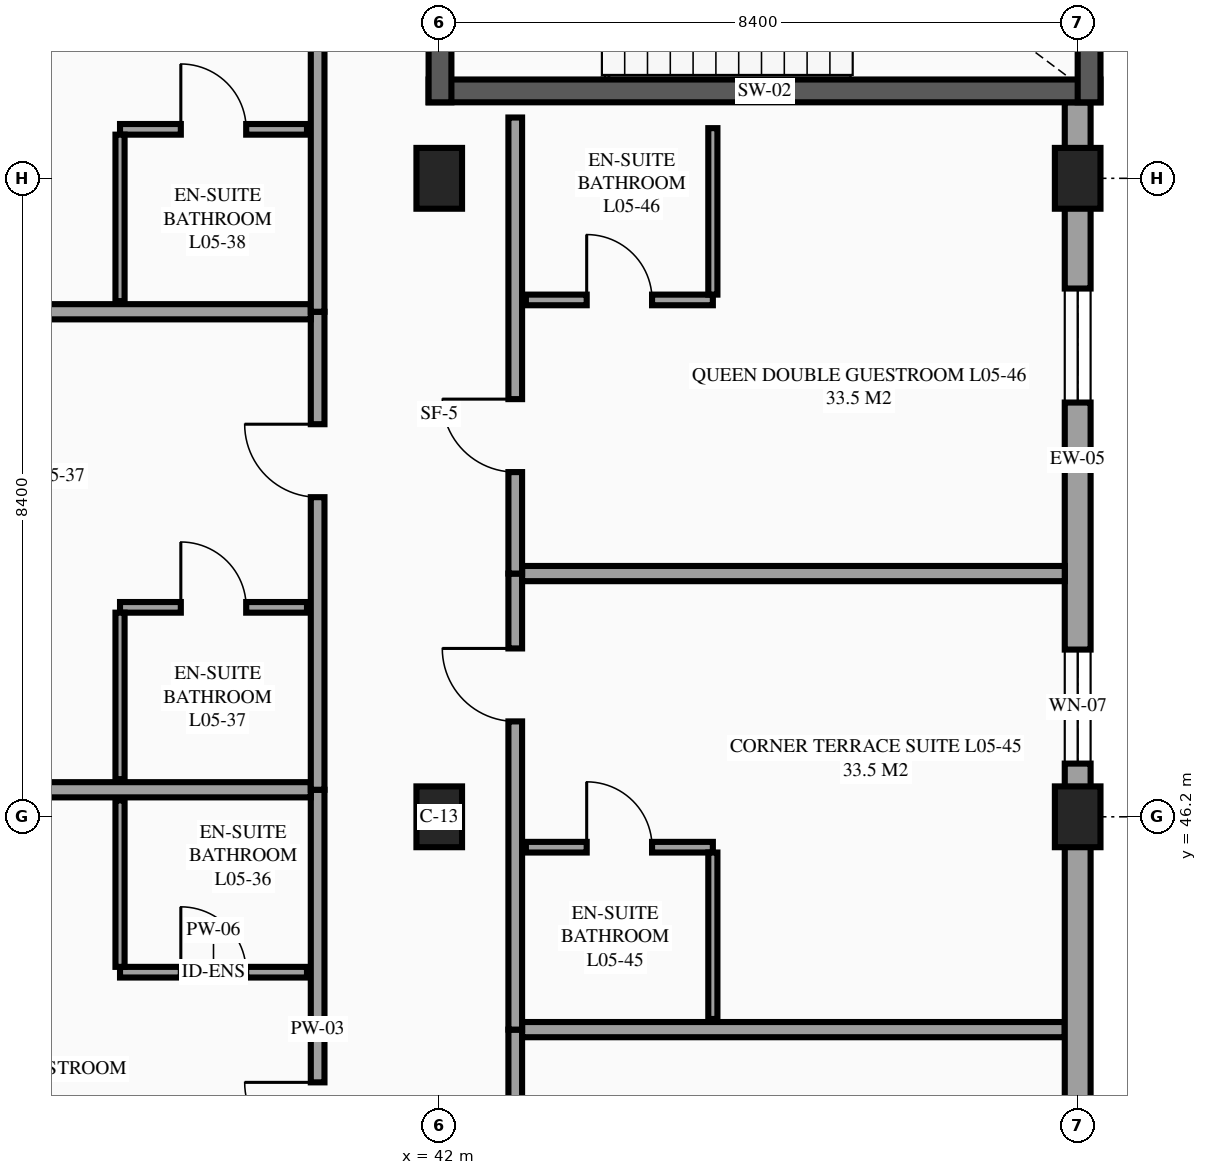
"""IFC4 building model, lengths in metres.
Left out: names, types, materials, properties, quantities, classifications, styles, units other than length and angle.
Written with IfcOpenShell. Run it as: python <this file> out.ifc"""

import sys

from ifc_helpers import new_model, si_unit, direction, frame, frame_2d, origin, origin_2d, place, context, subcontext, project, spatial, rectangle, extrude, element, fill, save


model = new_model("IFC4")
c1 = context("Model", 3, precision=1e-05, world=origin(), true_north=direction((0.0, 1.0)))
c2 = subcontext(c1, "Body", "Model", "MODEL_VIEW")
j1 = project(units=[si_unit("LENGTHUNIT", "METRE"), si_unit("PLANEANGLEUNIT", "RADIAN")], contexts=[c1])
p1 = place(None, origin())
s1 = spatial("IfcSite", under=j1, at=p1, CompositionType="ELEMENT")
p2 = place(p1, origin())
s2 = spatial("IfcBuilding", under=s1, at=p2, CompositionType="ELEMENT")
p3 = place(p2, frame((0.0, 0.0, 21.9)))
s3 = spatial("IfcBuildingStorey", under=s2, at=p3, CompositionType="ELEMENT", Elevation=21.9)
for number, where, z_axis, x_axis in (
    (1, (42.0, 46.2, 0.0), (0.0, 0.0, 1.0), (1.0, 0.0, 0.0)),
    (2, (42.0, 54.6, 0.0), (0.0, 0.0, 1.0), (1.0, 0.0, 0.0)),
    (3, (50.4, 46.2, 0.0), (0.0, 0.0, 1.0), (1.0, 0.0, 0.0)),
    (4, (50.4, 54.6, 0.0), (0.0, 0.0, 1.0), (1.0, 0.0, 0.0)),
):
    element("IfcColumn", number, at=place(p3, frame(where, z_axis=z_axis, x_axis=x_axis)), inside=s3, PredefinedType="COLUMN", context=c2, shape_type="SweptSolid", body=[
        extrude(rectangle(XDim=0.6, YDim=0.8, at=origin_2d()), origin(), (0.0, 0.0, 1.0), 3.6),
    ])
p4 = place(p3, frame((50.4, 46.2, 0.0), z_axis=(0.0, 0.0, 1.0), x_axis=(0.0, 1.0, 0.0)))
e5 = element("IfcWall", 5, at=p4, inside=s3, PredefinedType="STANDARD", context=c2, shape_type="SweptSolid", body=[
    extrude(rectangle(XDim=9.4, YDim=0.34, at=frame_2d((4.7, 0.0))), origin(), (0.0, 0.0, 1.0), 2.48),
])
p5 = place(p4, frame((0.7, 0.0, 0.85)))
e6 = element("IfcOpeningElement", 6, at=p5, cuts=e5, PredefinedType="OPENING", context=c2, shape_type="SweptSolid", body=[
    extrude(rectangle(XDim=1.5, YDim=1.5, at=frame_2d((0.75, 0.75))), frame((0.0, 0.18, 0.0), z_axis=(0.0, -1.0, 0.0), x_axis=(1.0, 0.0, 0.0)), (0.0, 0.0, 1.0), 0.36),
])
p6 = place(p4, frame((5.45, 0.0, 0.85)))
e7 = element("IfcOpeningElement", 7, at=p6, cuts=e5, PredefinedType="OPENING", context=c2, shape_type="SweptSolid", body=[
    extrude(rectangle(XDim=1.5, YDim=1.5, at=frame_2d((0.75, 0.75))), frame((0.0, 0.18, 0.0), z_axis=(0.0, -1.0, 0.0), x_axis=(1.0, 0.0, 0.0)), (0.0, 0.0, 1.0), 0.36),
])
p7 = place(p3, frame((41.86, 55.75, 0.0), z_axis=(0.0, 0.0, 1.0), x_axis=(1.0, 0.0, 0.0)))
e8 = element("IfcWall", 8, at=p7, inside=s3, PredefinedType="SHEAR", context=c2, shape_type="SweptSolid", body=[
    extrude(rectangle(XDim=8.84, YDim=0.3, at=frame_2d((4.42, 0.0))), origin(), (0.0, 0.0, 1.0), 3.6),
])
p8 = place(p3, frame((50.55, 55.6, 0.0), z_axis=(0.0, 0.0, 1.0), x_axis=(0.0, 1.0, 0.0)))
e9 = element("IfcWall", 9, at=p8, inside=s3, PredefinedType="SHEAR", context=c2, shape_type="SweptSolid", body=[
    extrude(rectangle(XDim=5.2, YDim=0.3, at=frame_2d((2.6, 0.0))), origin(), (0.0, 0.0, 1.0), 3.6),
])
p9 = place(p3, frame((42.01, 60.8, 0.0), z_axis=(0.0, 0.0, 1.0), x_axis=(0.0, -1.0, 0.0)))
e10 = element("IfcWall", 10, at=p9, inside=s3, PredefinedType="SHEAR", context=c2, shape_type="SweptSolid", body=[
    extrude(rectangle(XDim=5.2, YDim=0.3, at=frame_2d((2.6, 0.0))), origin(), (0.0, 0.0, 1.0), 3.6),
])
p10 = place(p9, frame((3.0, 0.0, 0.0)))
e11 = element("IfcOpeningElement", 11, at=p10, cuts=e10, PredefinedType="OPENING", context=c2, shape_type="SweptSolid", body=[
    extrude(rectangle(XDim=1.15, YDim=2.15, at=frame_2d((0.575, 1.075))), frame((0.0, 0.16, 0.0), z_axis=(0.0, -1.0, 0.0), x_axis=(1.0, 0.0, 0.0)), (0.0, 0.0, 1.0), 0.32),
])
p11 = place(p3, frame((40.4, 40.267, 0.0), z_axis=(0.0, 0.0, 1.0), x_axis=(0.0, 1.0, 0.0)))
e12 = element("IfcWall", 12, at=p11, inside=s3, PredefinedType="PARTITIONING", context=c2, shape_type="SweptSolid", body=[
    extrude(rectangle(XDim=6.289, YDim=0.18, at=frame_2d((3.145, 0.0))), origin(), (0.0, 0.0, 1.0), 3.375),
])
p12 = place(p11, frame((1.479, 0.0, 0.0)))
e13 = element("IfcOpeningElement", 13, at=p12, cuts=e12, PredefinedType="OPENING", context=c2, shape_type="SweptSolid", body=[
    extrude(rectangle(XDim=0.96, YDim=2.15, at=frame_2d((0.48, 1.075))), frame((0.0, 0.1, 0.0), z_axis=(0.0, -1.0, 0.0), x_axis=(1.0, 0.0, 0.0)), (0.0, 0.0, 1.0), 0.2),
])
p13 = place(p3, frame((34.05, 46.556, 0.0), z_axis=(0.0, 0.0, 1.0), x_axis=(1.0, 0.0, 0.0)))
e14 = element("IfcWall", 14, at=p13, inside=s3, PredefinedType="PARTITIONING", context=c2, shape_type="SweptSolid", body=[
    extrude(rectangle(XDim=6.26, YDim=0.2, at=frame_2d((3.13, 0.0))), origin(), (0.0, 0.0, 1.0), 3.375),
])
p14 = place(p3, frame((37.8, 44.156, 0.0), z_axis=(0.0, 0.0, 1.0), x_axis=(1.0, 0.0, 0.0)))
e15 = element("IfcWall", 15, at=p14, inside=s3, PredefinedType="PARTITIONING", context=c2, shape_type="SweptSolid", body=[
    extrude(rectangle(XDim=2.46, YDim=0.14, at=frame_2d((1.23, 0.0))), origin(), (0.0, 0.0, 1.0), 3.375),
])
p15 = place(p14, frame((0.8, 0.0, 0.0)))
e16 = element("IfcOpeningElement", 16, at=p15, cuts=e15, PredefinedType="OPENING", context=c2, shape_type="SweptSolid", body=[
    extrude(rectangle(XDim=0.86, YDim=2.1, at=frame_2d((0.43, 1.05))), frame((0.0, 0.08, 0.0), z_axis=(0.0, -1.0, 0.0), x_axis=(1.0, 0.0, 0.0)), (0.0, 0.0, 1.0), 0.16),
])
p16 = place(p3, frame((37.8, 44.226, 0.0), z_axis=(0.0, 0.0, 1.0), x_axis=(0.0, 1.0, 0.0)))
e17 = element("IfcWall", 17, at=p16, inside=s3, PredefinedType="PARTITIONING", context=c2, shape_type="SweptSolid", body=[
    extrude(rectangle(XDim=2.19, YDim=0.12, at=frame_2d((1.095, 0.0))), origin(), (0.0, 0.0, 1.0), 3.375),
])
p17 = place(p3, frame((40.4, 46.556, 0.0), z_axis=(0.0, 0.0, 1.0), x_axis=(0.0, 1.0, 0.0)))
e18 = element("IfcWall", 18, at=p17, inside=s3, PredefinedType="PARTITIONING", context=c2, shape_type="SweptSolid", body=[
    extrude(rectangle(XDim=6.289, YDim=0.18, at=frame_2d((3.145, 0.0))), origin(), (0.0, 0.0, 1.0), 3.375),
])
p18 = place(p17, frame((3.849, 0.0, 0.0)))
e19 = element("IfcOpeningElement", 19, at=p18, cuts=e18, PredefinedType="OPENING", context=c2, shape_type="SweptSolid", body=[
    extrude(rectangle(XDim=0.96, YDim=2.15, at=frame_2d((0.48, 1.075))), frame((0.0, 0.1, 0.0), z_axis=(0.0, -1.0, 0.0), x_axis=(1.0, 0.0, 0.0)), (0.0, 0.0, 1.0), 0.2),
])
p19 = place(p3, frame((33.77, 52.844, 0.0), z_axis=(0.0, 0.0, 1.0), x_axis=(1.0, 0.0, 0.0)))
e20 = element("IfcWall", 20, at=p19, inside=s3, PredefinedType="PARTITIONING", context=c2, shape_type="SweptSolid", body=[
    extrude(rectangle(XDim=6.54, YDim=0.2, at=frame_2d((3.27, 0.0))), origin(), (0.0, 0.0, 1.0), 3.375),
])
p20 = place(p3, frame((37.8, 48.956, 0.0), z_axis=(0.0, 0.0, 1.0), x_axis=(1.0, 0.0, 0.0)))
e21 = element("IfcWall", 21, at=p20, inside=s3, PredefinedType="PARTITIONING", context=c2, shape_type="SweptSolid", body=[
    extrude(rectangle(XDim=2.46, YDim=0.14, at=frame_2d((1.23, 0.0))), origin(), (0.0, 0.0, 1.0), 3.375),
])
p21 = place(p20, frame((0.8, 0.0, 0.0)))
e22 = element("IfcOpeningElement", 22, at=p21, cuts=e21, PredefinedType="OPENING", context=c2, shape_type="SweptSolid", body=[
    extrude(rectangle(XDim=0.86, YDim=2.1, at=frame_2d((0.43, 1.05))), frame((0.0, 0.08, 0.0), z_axis=(0.0, -1.0, 0.0), x_axis=(1.0, 0.0, 0.0)), (0.0, 0.0, 1.0), 0.16),
])
p22 = place(p3, frame((37.8, 46.696, 0.0), z_axis=(0.0, 0.0, 1.0), x_axis=(0.0, 1.0, 0.0)))
e23 = element("IfcWall", 23, at=p22, inside=s3, PredefinedType="PARTITIONING", context=c2, shape_type="SweptSolid", body=[
    extrude(rectangle(XDim=2.19, YDim=0.12, at=frame_2d((1.095, 0.0))), origin(), (0.0, 0.0, 1.0), 3.375),
])
p23 = place(p3, frame((40.4, 52.844, 0.0), z_axis=(0.0, 0.0, 1.0), x_axis=(0.0, 1.0, 0.0)))
e24 = element("IfcWall", 24, at=p23, inside=s3, PredefinedType="PARTITIONING", context=c2, shape_type="SweptSolid", body=[
    extrude(rectangle(XDim=6.289, YDim=0.18, at=frame_2d((3.145, 0.0))), origin(), (0.0, 0.0, 1.0), 3.375),
])
p24 = place(p23, frame((3.85, 0.0, 0.0)))
e25 = element("IfcOpeningElement", 25, at=p24, cuts=e24, PredefinedType="OPENING", context=c2, shape_type="SweptSolid", body=[
    extrude(rectangle(XDim=0.96, YDim=2.15, at=frame_2d((0.48, 1.075))), frame((0.0, 0.1, 0.0), z_axis=(0.0, -1.0, 0.0), x_axis=(1.0, 0.0, 0.0)), (0.0, 0.0, 1.0), 0.2),
])
p25 = place(p3, frame((37.8, 55.244, 0.0), z_axis=(0.0, 0.0, 1.0), x_axis=(1.0, 0.0, 0.0)))
e26 = element("IfcWall", 26, at=p25, inside=s3, PredefinedType="PARTITIONING", context=c2, shape_type="SweptSolid", body=[
    extrude(rectangle(XDim=2.46, YDim=0.14, at=frame_2d((1.23, 0.0))), origin(), (0.0, 0.0, 1.0), 3.375),
])
p26 = place(p25, frame((0.8, 0.0, 0.0)))
e27 = element("IfcOpeningElement", 27, at=p26, cuts=e26, PredefinedType="OPENING", context=c2, shape_type="SweptSolid", body=[
    extrude(rectangle(XDim=0.86, YDim=2.1, at=frame_2d((0.43, 1.05))), frame((0.0, 0.08, 0.0), z_axis=(0.0, -1.0, 0.0), x_axis=(1.0, 0.0, 0.0)), (0.0, 0.0, 1.0), 0.16),
])
p27 = place(p3, frame((37.8, 52.984, 0.0), z_axis=(0.0, 0.0, 1.0), x_axis=(0.0, 1.0, 0.0)))
e28 = element("IfcWall", 28, at=p27, inside=s3, PredefinedType="PARTITIONING", context=c2, shape_type="SweptSolid", body=[
    extrude(rectangle(XDim=2.19, YDim=0.12, at=frame_2d((1.095, 0.0))), origin(), (0.0, 0.0, 1.0), 3.375),
])
p28 = place(p3, frame((43.0, 37.4, 0.0), z_axis=(0.0, 0.0, 1.0), x_axis=(0.0, 1.0, 0.0)))
e29 = element("IfcWall", 29, at=p28, inside=s3, PredefinedType="PARTITIONING", context=c2, shape_type="SweptSolid", body=[
    extrude(rectangle(XDim=6.0, YDim=0.18, at=frame_2d((3.0, 0.0))), origin(), (0.0, 0.0, 1.0), 3.375),
])
p29 = place(p28, frame((3.705, 0.0, 0.0)))
e30 = element("IfcOpeningElement", 30, at=p29, cuts=e29, PredefinedType="OPENING", context=c2, shape_type="SweptSolid", body=[
    extrude(rectangle(XDim=0.96, YDim=2.15, at=frame_2d((0.48, 1.075))), frame((0.0, 0.1, 0.0), z_axis=(0.0, -1.0, 0.0), x_axis=(1.0, 0.0, 0.0)), (0.0, 0.0, 1.0), 0.2),
])
p30 = place(p3, frame((43.09, 43.4, 0.0), z_axis=(0.0, 0.0, 1.0), x_axis=(1.0, 0.0, 0.0)))
e31 = element("IfcWall", 31, at=p30, inside=s3, PredefinedType="PARTITIONING", context=c2, shape_type="SweptSolid", body=[
    extrude(rectangle(XDim=7.14, YDim=0.2, at=frame_2d((3.57, 0.0))), origin(), (0.0, 0.0, 1.0), 3.375),
])
p31 = place(p3, frame((43.0, 43.4, 0.0), z_axis=(0.0, 0.0, 1.0), x_axis=(0.0, 1.0, 0.0)))
e32 = element("IfcWall", 32, at=p31, inside=s3, PredefinedType="PARTITIONING", context=c2, shape_type="SweptSolid", body=[
    extrude(rectangle(XDim=6.0, YDim=0.18, at=frame_2d((3.0, 0.0))), origin(), (0.0, 0.0, 1.0), 3.375),
])
p32 = place(p31, frame((4.055, 0.0, 0.0)))
e33 = element("IfcOpeningElement", 33, at=p32, cuts=e32, PredefinedType="OPENING", context=c2, shape_type="SweptSolid", body=[
    extrude(rectangle(XDim=0.96, YDim=2.15, at=frame_2d((0.48, 1.075))), frame((0.0, 0.1, 0.0), z_axis=(0.0, -1.0, 0.0), x_axis=(1.0, 0.0, 0.0)), (0.0, 0.0, 1.0), 0.2),
])
p33 = place(p3, frame((43.09, 49.4, 0.0), z_axis=(0.0, 0.0, 1.0), x_axis=(1.0, 0.0, 0.0)))
e34 = element("IfcWall", 34, at=p33, inside=s3, PredefinedType="PARTITIONING", context=c2, shape_type="SweptSolid", body=[
    extrude(rectangle(XDim=7.14, YDim=0.2, at=frame_2d((3.57, 0.0))), origin(), (0.0, 0.0, 1.0), 3.375),
])
p34 = place(p3, frame((43.14, 45.8, 0.0), z_axis=(0.0, 0.0, 1.0), x_axis=(1.0, 0.0, 0.0)))
e35 = element("IfcWall", 35, at=p34, inside=s3, PredefinedType="PARTITIONING", context=c2, shape_type="SweptSolid", body=[
    extrude(rectangle(XDim=2.46, YDim=0.14, at=frame_2d((1.23, 0.0))), origin(), (0.0, 0.0, 1.0), 3.375),
])
p35 = place(p34, frame((0.8, 0.0, 0.0)))
e36 = element("IfcOpeningElement", 36, at=p35, cuts=e35, PredefinedType="OPENING", context=c2, shape_type="SweptSolid", body=[
    extrude(rectangle(XDim=0.86, YDim=2.1, at=frame_2d((0.43, 1.05))), frame((0.0, 0.08, 0.0), z_axis=(0.0, -1.0, 0.0), x_axis=(1.0, 0.0, 0.0)), (0.0, 0.0, 1.0), 0.16),
])
p36 = place(p3, frame((45.6, 43.54, 0.0), z_axis=(0.0, 0.0, 1.0), x_axis=(0.0, 1.0, 0.0)))
e37 = element("IfcWall", 37, at=p36, inside=s3, PredefinedType="PARTITIONING", context=c2, shape_type="SweptSolid", body=[
    extrude(rectangle(XDim=2.19, YDim=0.12, at=frame_2d((1.095, 0.0))), origin(), (0.0, 0.0, 1.0), 3.375),
])
p37 = place(p3, frame((43.0, 49.4, 0.0), z_axis=(0.0, 0.0, 1.0), x_axis=(0.0, 1.0, 0.0)))
e38 = element("IfcWall", 38, at=p37, inside=s3, PredefinedType="PARTITIONING", context=c2, shape_type="SweptSolid", body=[
    extrude(rectangle(XDim=6.0, YDim=0.18, at=frame_2d((3.0, 0.0))), origin(), (0.0, 0.0, 1.0), 3.375),
])
p38 = place(p37, frame((1.335, 0.0, 0.0)))
e39 = element("IfcOpeningElement", 39, at=p38, cuts=e38, PredefinedType="OPENING", context=c2, shape_type="SweptSolid", body=[
    extrude(rectangle(XDim=0.96, YDim=2.15, at=frame_2d((0.48, 1.075))), frame((0.0, 0.1, 0.0), z_axis=(0.0, -1.0, 0.0), x_axis=(1.0, 0.0, 0.0)), (0.0, 0.0, 1.0), 0.2),
])
p39 = place(p3, frame((43.14, 53.0, 0.0), z_axis=(0.0, 0.0, 1.0), x_axis=(1.0, 0.0, 0.0)))
e40 = element("IfcWall", 40, at=p39, inside=s3, PredefinedType="PARTITIONING", context=c2, shape_type="SweptSolid", body=[
    extrude(rectangle(XDim=2.46, YDim=0.14, at=frame_2d((1.23, 0.0))), origin(), (0.0, 0.0, 1.0), 3.375),
])
p40 = place(p39, frame((0.8, 0.0, 0.0)))
e41 = element("IfcOpeningElement", 41, at=p40, cuts=e40, PredefinedType="OPENING", context=c2, shape_type="SweptSolid", body=[
    extrude(rectangle(XDim=0.86, YDim=2.1, at=frame_2d((0.43, 1.05))), frame((0.0, 0.08, 0.0), z_axis=(0.0, -1.0, 0.0), x_axis=(1.0, 0.0, 0.0)), (0.0, 0.0, 1.0), 0.16),
])
p41 = place(p3, frame((45.6, 53.07, 0.0), z_axis=(0.0, 0.0, 1.0), x_axis=(0.0, 1.0, 0.0)))
e42 = element("IfcWall", 42, at=p41, inside=s3, PredefinedType="PARTITIONING", context=c2, shape_type="SweptSolid", body=[
    extrude(rectangle(XDim=2.19, YDim=0.12, at=frame_2d((1.095, 0.0))), origin(), (0.0, 0.0, 1.0), 3.375),
])
p42 = place(p3, frame((50.4, 37.8, 0.0), z_axis=(0.0, 0.0, 1.0), x_axis=(0.0, 1.0, 0.0)))
e43 = element("IfcWall", 43, at=p42, inside=s3, PredefinedType="STANDARD", context=c2, shape_type="SweptSolid", body=[
    extrude(rectangle(XDim=8.4, YDim=0.34, at=frame_2d((4.2, 0.0))), origin(), (0.0, 0.0, 1.0), 2.88),
])
p43 = place(p42, frame((1.85, 0.0, 0.85)))
e44 = element("IfcOpeningElement", 44, at=p43, cuts=e43, PredefinedType="OPENING", context=c2, shape_type="SweptSolid", body=[
    extrude(rectangle(XDim=1.5, YDim=1.5, at=frame_2d((0.75, 0.75))), frame((0.0, 0.18, 0.0), z_axis=(0.0, -1.0, 0.0), x_axis=(1.0, 0.0, 0.0)), (0.0, 0.0, 1.0), 0.36),
])
p44 = place(p5, origin())
e45 = element("IfcWindow", 45, at=p44, inside=s3, PartitioningType="SINGLE_PANEL", PredefinedType="WINDOW", context=c2, shape_type="SweptSolid", body=[
    extrude(rectangle(XDim=1.5, YDim=1.5, at=frame_2d((0.75, 0.75))), frame((0.0, 0.03, 0.0), z_axis=(0.0, -1.0, 0.0), x_axis=(1.0, 0.0, 0.0)), (0.0, 0.0, 1.0), 0.06),
])
fill(e6, e45)
p45 = place(p6, origin())
e46 = element("IfcWindow", 46, at=p45, inside=s3, PartitioningType="SINGLE_PANEL", PredefinedType="WINDOW", context=c2, shape_type="SweptSolid", body=[
    extrude(rectangle(XDim=1.5, YDim=1.5, at=frame_2d((0.75, 0.75))), frame((0.0, 0.03, 0.0), z_axis=(0.0, -1.0, 0.0), x_axis=(1.0, 0.0, 0.0)), (0.0, 0.0, 1.0), 0.06),
])
fill(e7, e46)
p46 = place(p12, origin())
e47 = element("IfcDoor", 47, at=p46, inside=s3, OperationType="SINGLE_SWING_RIGHT", PredefinedType="DOOR", context=c2, shape_type="SweptSolid", body=[
    extrude(rectangle(XDim=0.96, YDim=2.15, at=frame_2d((0.48, 1.075))), frame((0.0, 0.025, 0.0), z_axis=(0.0, -1.0, 0.0), x_axis=(1.0, 0.0, 0.0)), (0.0, 0.0, 1.0), 0.05),
])
fill(e13, e47)
p47 = place(p15, origin())
e48 = element("IfcDoor", 48, at=p47, inside=s3, OperationType="SINGLE_SWING_LEFT", PredefinedType="DOOR", context=c2, shape_type="SweptSolid", body=[
    extrude(rectangle(XDim=0.86, YDim=2.1, at=frame_2d((0.43, 1.05))), frame((0.0, 0.025, 0.0), z_axis=(0.0, -1.0, 0.0), x_axis=(1.0, 0.0, 0.0)), (0.0, 0.0, 1.0), 0.05),
])
fill(e16, e48)
p48 = place(p18, origin())
e49 = element("IfcDoor", 49, at=p48, inside=s3, OperationType="SINGLE_SWING_RIGHT", PredefinedType="DOOR", context=c2, shape_type="SweptSolid", body=[
    extrude(rectangle(XDim=0.96, YDim=2.15, at=frame_2d((0.48, 1.075))), frame((0.0, 0.025, 0.0), z_axis=(0.0, -1.0, 0.0), x_axis=(1.0, 0.0, 0.0)), (0.0, 0.0, 1.0), 0.05),
])
fill(e19, e49)
p49 = place(p21, origin())
e50 = element("IfcDoor", 50, at=p49, inside=s3, OperationType="SINGLE_SWING_LEFT", PredefinedType="DOOR", context=c2, shape_type="SweptSolid", body=[
    extrude(rectangle(XDim=0.86, YDim=2.1, at=frame_2d((0.43, 1.05))), frame((0.0, 0.025, 0.0), z_axis=(0.0, -1.0, 0.0), x_axis=(1.0, 0.0, 0.0)), (0.0, 0.0, 1.0), 0.05),
])
fill(e22, e50)
p50 = place(p26, origin())
e51 = element("IfcDoor", 51, at=p50, inside=s3, OperationType="SINGLE_SWING_LEFT", PredefinedType="DOOR", context=c2, shape_type="SweptSolid", body=[
    extrude(rectangle(XDim=0.86, YDim=2.1, at=frame_2d((0.43, 1.05))), frame((0.0, 0.025, 0.0), z_axis=(0.0, -1.0, 0.0), x_axis=(1.0, 0.0, 0.0)), (0.0, 0.0, 1.0), 0.05),
])
fill(e27, e51)
p51 = place(p32, origin())
e52 = element("IfcDoor", 52, at=p51, inside=s3, OperationType="SINGLE_SWING_RIGHT", PredefinedType="DOOR", context=c2, shape_type="SweptSolid", body=[
    extrude(rectangle(XDim=0.96, YDim=2.15, at=frame_2d((0.48, 1.075))), frame((0.0, 0.025, 0.0), z_axis=(0.0, -1.0, 0.0), x_axis=(1.0, 0.0, 0.0)), (0.0, 0.0, 1.0), 0.05),
])
fill(e33, e52)
p52 = place(p35, origin())
e53 = element("IfcDoor", 53, at=p52, inside=s3, OperationType="SINGLE_SWING_LEFT", PredefinedType="DOOR", context=c2, shape_type="SweptSolid", body=[
    extrude(rectangle(XDim=0.86, YDim=2.1, at=frame_2d((0.43, 1.05))), frame((0.0, 0.025, 0.0), z_axis=(0.0, -1.0, 0.0), x_axis=(1.0, 0.0, 0.0)), (0.0, 0.0, 1.0), 0.05),
])
fill(e36, e53)
p53 = place(p38, origin())
e54 = element("IfcDoor", 54, at=p53, inside=s3, OperationType="SINGLE_SWING_RIGHT", PredefinedType="DOOR", context=c2, shape_type="SweptSolid", body=[
    extrude(rectangle(XDim=0.96, YDim=2.15, at=frame_2d((0.48, 1.075))), frame((0.0, 0.025, 0.0), z_axis=(0.0, -1.0, 0.0), x_axis=(1.0, 0.0, 0.0)), (0.0, 0.0, 1.0), 0.05),
])
fill(e39, e54)
p54 = place(p40, origin())
e55 = element("IfcDoor", 55, at=p54, inside=s3, OperationType="SINGLE_SWING_LEFT", PredefinedType="DOOR", context=c2, shape_type="SweptSolid", body=[
    extrude(rectangle(XDim=0.86, YDim=2.1, at=frame_2d((0.43, 1.05))), frame((0.0, 0.025, 0.0), z_axis=(0.0, -1.0, 0.0), x_axis=(1.0, 0.0, 0.0)), (0.0, 0.0, 1.0), 0.05),
])
fill(e41, e55)
save(model, sys.argv[1])
